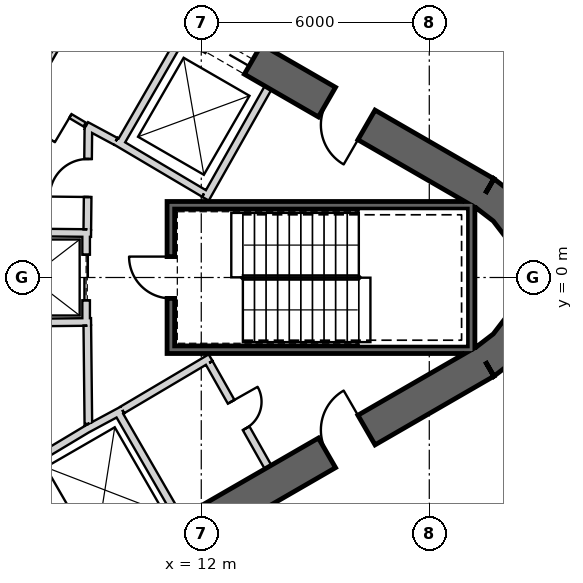
"""IFC4 building model, lengths in metres.
Left out: names, types, materials, properties, quantities, classifications, styles, units other than length and angle.
Written with IfcOpenShell. Run it as: python <this file> out.ifc"""

import sys

from ifc_helpers import new_model, si_unit, direction, frame, frame_2d, origin, place, context, subcontext, project, spatial, polyline, rectangle, outline, extrude, element, fill, save


model = new_model("IFC4")
c1 = context("Model", 3, precision=1e-05, world=origin(), true_north=direction((0.0, 1.0)))
c2 = subcontext(c1, "Body", "Model", "MODEL_VIEW")
j1 = project(units=[si_unit("LENGTHUNIT", "METRE"), si_unit("PLANEANGLEUNIT", "RADIAN")], contexts=[c1])
p1 = place(None, origin())
s1 = spatial("IfcSite", under=j1, at=p1, CompositionType="ELEMENT")
p2 = place(p1, origin())
s2 = spatial("IfcBuilding", under=s1, at=p2, CompositionType="ELEMENT")
p3 = place(p2, frame((0.0, 0.0, 217.2)))
s3 = spatial("IfcBuildingStorey", under=s2, at=p3, CompositionType="ELEMENT", Elevation=217.2)
p4 = place(p3, frame((19.475, 2.208, 0.0), z_axis=(0.0, 0.0, 1.0), x_axis=(-0.866028369851, 0.499994862586, 0.0)))
e1 = element("IfcWall", 1, at=p4, inside=s3, PredefinedType="SHEAR", context=c2, shape_type="SweptSolid", body=[
    extrude(rectangle(XDim=31.523, YDim=0.9, at=frame_2d((15.762, 0.0))), origin(), (0.0, 0.0, 1.0), 4.0),
])
p5 = place(p4, frame((7.062, 0.0, 0.0)))
e2 = element("IfcOpeningElement", 2, at=p5, cuts=e1, PredefinedType="OPENING", context=c2, shape_type="SweptSolid", body=[
    extrude(rectangle(XDim=1.2, YDim=2.4, at=frame_2d((0.6, 1.2))), frame((0.0, 0.46, 0.0), z_axis=(0.0, -1.0, 0.0), x_axis=(1.0, 0.0, 0.0)), (0.0, 0.0, 1.0), 0.92),
])
p6 = place(p4, frame((3.612, 0.0, 0.0)))
e3 = element("IfcOpeningElement", 3, at=p6, cuts=e1, PredefinedType="OPENING", context=c2, shape_type="SweptSolid", body=[
    extrude(rectangle(XDim=1.2, YDim=2.4, at=frame_2d((0.6, 1.2))), frame((0.0, 0.46, 0.0), z_axis=(0.0, -1.0, 0.0), x_axis=(1.0, 0.0, 0.0)), (0.0, 0.0, 1.0), 0.92),
])
p7 = place(p4, frame((26.712, 0.0, 0.0)))
e4 = element("IfcOpeningElement", 4, at=p7, cuts=e1, PredefinedType="OPENING", context=c2, shape_type="SweptSolid", body=[
    extrude(rectangle(XDim=1.2, YDim=2.4, at=frame_2d((0.6, 1.2))), frame((0.0, 0.46, 0.0), z_axis=(0.0, -1.0, 0.0), x_axis=(1.0, 0.0, 0.0)), (0.0, 0.0, 1.0), 0.92),
])
p8 = place(p3, frame((-7.825, -17.97, 0.0), z_axis=(0.0, 0.0, 1.0), x_axis=(0.866028369851, 0.499994862586, 0.0)))
e5 = element("IfcWall", 5, at=p8, inside=s3, PredefinedType="SHEAR", context=c2, shape_type="SweptSolid", body=[
    extrude(rectangle(XDim=31.523, YDim=0.9, at=frame_2d((15.762, 0.0))), origin(), (0.0, 0.0, 1.0), 4.0),
])
p9 = place(p8, frame((7.062, 0.0, 0.0)))
e6 = element("IfcOpeningElement", 6, at=p9, cuts=e5, PredefinedType="OPENING", context=c2, shape_type="SweptSolid", body=[
    extrude(rectangle(XDim=1.2, YDim=2.4, at=frame_2d((0.6, 1.2))), frame((0.0, 0.46, 0.0), z_axis=(0.0, -1.0, 0.0), x_axis=(1.0, 0.0, 0.0)), (0.0, 0.0, 1.0), 0.92),
])
p10 = place(p8, frame((9.762, 0.0, 0.0)))
e7 = element("IfcOpeningElement", 7, at=p10, cuts=e5, PredefinedType="OPENING", context=c2, shape_type="SweptSolid", body=[
    extrude(rectangle(XDim=1.2, YDim=2.4, at=frame_2d((0.6, 1.2))), frame((0.0, 0.46, 0.0), z_axis=(0.0, -1.0, 0.0), x_axis=(1.0, 0.0, 0.0)), (0.0, 0.0, 1.0), 0.92),
])
p11 = place(p8, frame((12.462, 0.0, 0.0)))
e8 = element("IfcOpeningElement", 8, at=p11, cuts=e5, PredefinedType="OPENING", context=c2, shape_type="SweptSolid", body=[
    extrude(rectangle(XDim=1.2, YDim=2.4, at=frame_2d((0.6, 1.2))), frame((0.0, 0.46, 0.0), z_axis=(0.0, -1.0, 0.0), x_axis=(1.0, 0.0, 0.0)), (0.0, 0.0, 1.0), 0.92),
])
p12 = place(p8, frame((15.162, 0.0, 0.0)))
e9 = element("IfcOpeningElement", 9, at=p12, cuts=e5, PredefinedType="OPENING", context=c2, shape_type="SweptSolid", body=[
    extrude(rectangle(XDim=1.2, YDim=2.4, at=frame_2d((0.6, 1.2))), frame((0.0, 0.46, 0.0), z_axis=(0.0, -1.0, 0.0), x_axis=(1.0, 0.0, 0.0)), (0.0, 0.0, 1.0), 0.92),
])
p13 = place(p8, frame((17.862, 0.0, 0.0)))
e10 = element("IfcOpeningElement", 10, at=p13, cuts=e5, PredefinedType="OPENING", context=c2, shape_type="SweptSolid", body=[
    extrude(rectangle(XDim=1.2, YDim=2.4, at=frame_2d((0.6, 1.2))), frame((0.0, 0.46, 0.0), z_axis=(0.0, -1.0, 0.0), x_axis=(1.0, 0.0, 0.0)), (0.0, 0.0, 1.0), 0.92),
])
p14 = place(p8, frame((20.562, 0.0, 0.0)))
e11 = element("IfcOpeningElement", 11, at=p14, cuts=e5, PredefinedType="OPENING", context=c2, shape_type="SweptSolid", body=[
    extrude(rectangle(XDim=1.2, YDim=2.4, at=frame_2d((0.6, 1.2))), frame((0.0, 0.46, 0.0), z_axis=(0.0, -1.0, 0.0), x_axis=(1.0, 0.0, 0.0)), (0.0, 0.0, 1.0), 0.92),
])
p15 = place(p8, frame((26.712, 0.0, 0.0)))
e12 = element("IfcOpeningElement", 12, at=p15, cuts=e5, PredefinedType="OPENING", context=c2, shape_type="SweptSolid", body=[
    extrude(rectangle(XDim=1.2, YDim=2.4, at=frame_2d((0.6, 1.2))), frame((0.0, 0.46, 0.0), z_axis=(0.0, -1.0, 0.0), x_axis=(1.0, 0.0, 0.0)), (0.0, 0.0, 1.0), 0.92),
])
p16 = place(p8, frame((3.612, 0.0, 0.0)))
e13 = element("IfcOpeningElement", 13, at=p16, cuts=e5, PredefinedType="OPENING", context=c2, shape_type="SweptSolid", body=[
    extrude(rectangle(XDim=1.2, YDim=2.4, at=frame_2d((0.6, 1.2))), frame((0.0, 0.46, 0.0), z_axis=(0.0, -1.0, 0.0), x_axis=(1.0, 0.0, 0.0)), (0.0, 0.0, 1.0), 0.92),
])
p17 = place(p3, origin())
e14 = element("IfcWall", 14, at=p17, inside=s3, PredefinedType="SHEAR", context=c2, shape_type="SweptSolid", body=[
    extrude(outline(polyline([(19.7, -2.598), (20.321, -2.121), (20.798, -1.5), (21.098, -0.777), (21.2, 0.0), (21.098, 0.777), (20.798, 1.5), (20.321, 2.121), (19.7, 2.598), (19.25, 1.819), (19.685, 1.485), (20.019, 1.05), (20.229, 0.543), (20.3, 0.0), (20.229, -0.543), (20.019, -1.05), (19.685, -1.485), (19.25, -1.819), (19.7, -2.598)])), origin(), (0.0, 0.0, 1.0), 4.0),
])
p18 = place(p3, frame((9.847, 3.495, 0.0), z_axis=(0.0, 0.0, 1.0), x_axis=(0.499984717929, 0.866034226713, 0.0)))
e15 = element("IfcWall", 15, at=p18, inside=s3, PredefinedType="PLUMBINGWALL", context=c2, shape_type="SweptSolid", body=[
    extrude(rectangle(XDim=3.25, YDim=0.2, at=frame_2d((1.625, 0.0))), origin(), (0.0, 0.0, 1.0), 3.7),
])
p19 = place(p3, frame((12.11, 2.073, 0.0), z_axis=(0.0, 0.0, 1.0), x_axis=(0.49196600604, 0.870614408852, 0.0)))
e16 = element("IfcWall", 16, at=p19, inside=s3, PredefinedType="PLUMBINGWALL", context=c2, shape_type="SweptSolid", body=[
    extrude(rectangle(XDim=3.35, YDim=0.2, at=frame_2d((1.675, 0.0))), origin(), (0.0, 0.0, 1.0), 3.7),
])
p20 = place(p3, frame((12.073, 2.211, 0.0), z_axis=(0.0, 0.0, 1.0), x_axis=(-0.860414880418, 0.509594185166, 0.0)))
e17 = element("IfcWall", 17, at=p20, inside=s3, PredefinedType="PLUMBINGWALL", context=c2, shape_type="SweptSolid", body=[
    extrude(rectangle(XDim=2.7, YDim=0.2, at=frame_2d((1.35, 0.0))), origin(), (0.0, 0.0, 1.0), 3.7),
])
p21 = place(p3, frame((9.795, -3.525, 0.0), z_axis=(0.0, 0.0, 1.0), x_axis=(0.499984717929, -0.866034226713, 0.0)))
e18 = element("IfcWall", 18, at=p21, inside=s3, PredefinedType="PLUMBINGWALL", context=c2, shape_type="SweptSolid", body=[
    extrude(rectangle(XDim=3.25, YDim=0.2, at=frame_2d((1.625, 0.0))), origin(), (0.0, 0.0, 1.0), 3.7),
])
p22 = place(p3, frame((8.974, -3.999, 0.0), z_axis=(0.0, 0.0, 1.0), x_axis=(0.880907015104, 0.473289373154, 0.0)))
e19 = element("IfcWall", 19, at=p22, inside=s3, PredefinedType="PLUMBINGWALL", context=c2, shape_type="SweptSolid", body=[
    extrude(rectangle(XDim=1.078, YDim=0.2, at=frame_2d((0.539, 0.0))), origin(), (0.0, 0.0, 1.0), 3.7),
])
p23 = place(p3, frame((7.497, -4.886, 0.0), z_axis=(0.0, 0.0, 1.0), x_axis=(0.857516281273, 0.51445682749, 0.0)))
e20 = element("IfcWall", 20, at=p23, inside=s3, PredefinedType="PLUMBINGWALL", context=c2, shape_type="SweptSolid", body=[
    extrude(rectangle(XDim=1.845, YDim=0.2, at=frame_2d((0.922, 0.0))), origin(), (0.0, 0.0, 1.0), 3.7),
])
p24 = place(p3, frame((19.2, 1.9, -0.3), z_axis=(0.0, 0.0, 1.0), x_axis=(-1.0, 0.0, 0.0)))
e21 = element("IfcWall", 21, at=p24, inside=s3, PredefinedType="SHEAR", context=c2, shape_type="SweptSolid", body=[
    extrude(rectangle(XDim=8.1, YDim=0.2, at=frame_2d((4.05, 0.0))), origin(), (0.0, 0.0, 1.0), 4.0),
])
p25 = place(p3, frame((19.1, -2.0, -0.3), z_axis=(0.0, 0.0, 1.0), x_axis=(0.0, 1.0, 0.0)))
e22 = element("IfcWall", 22, at=p25, inside=s3, PredefinedType="SHEAR", context=c2, shape_type="SweptSolid", body=[
    extrude(rectangle(XDim=3.8, YDim=0.2, at=frame_2d((1.9, 0.0))), origin(), (0.0, 0.0, 1.0), 4.0),
])
p26 = place(p3, frame((11.1, -1.9, -0.3), z_axis=(0.0, 0.0, 1.0), x_axis=(1.0, 0.0, 0.0)))
e23 = element("IfcWall", 23, at=p26, inside=s3, PredefinedType="SHEAR", context=c2, shape_type="SweptSolid", body=[
    extrude(rectangle(XDim=7.9, YDim=0.2, at=frame_2d((3.95, 0.0))), origin(), (0.0, 0.0, 1.0), 4.0),
])
p27 = place(p3, frame((11.2, -1.8, -0.3), z_axis=(0.0, 0.0, 1.0), x_axis=(0.0, 1.0, 0.0)))
e24 = element("IfcWall", 24, at=p27, inside=s3, PredefinedType="SHEAR", context=c2, shape_type="SweptSolid", body=[
    extrude(rectangle(XDim=3.6, YDim=0.2, at=frame_2d((1.8, 0.0))), origin(), (0.0, 0.0, 1.0), 4.0),
])
p28 = place(p27, frame((1.25, 0.0, 0.3)))
e25 = element("IfcOpeningElement", 25, at=p28, cuts=e24, PredefinedType="OPENING", context=c2, shape_type="SweptSolid", body=[
    extrude(rectangle(XDim=1.1, YDim=2.1, at=frame_2d((0.55, 1.05))), frame((0.0, 0.11, 0.0), z_axis=(0.0, -1.0, 0.0), x_axis=(1.0, 0.0, 0.0)), (0.0, 0.0, 1.0), 0.22),
])
p29 = place(p3, frame((8.97, 1.2, 0.0), z_axis=(0.0, 0.0, 1.0), x_axis=(0.0, -1.0, 0.0)))
e26 = element("IfcWall", 26, at=p29, inside=s3, PredefinedType="PLUMBINGWALL", context=c2, shape_type="SweptSolid", body=[
    extrude(rectangle(XDim=2.4, YDim=0.2, at=frame_2d((1.2, 0.0))), origin(), (0.0, 0.0, 1.0), 3.7),
])
p30 = place(p29, frame((0.6, 0.0, 0.0)))
e27 = element("IfcOpeningElement", 27, at=p30, cuts=e26, PredefinedType="OPENING", context=c2, shape_type="SweptSolid", body=[
    extrude(rectangle(XDim=1.2, YDim=2.4, at=frame_2d((0.6, 1.2))), frame((0.0, 0.11, 0.0), z_axis=(0.0, -1.0, 0.0), x_axis=(1.0, 0.0, 0.0)), (0.0, 0.0, 1.0), 0.22),
])
p31 = place(p3, frame((9.1, -1.169, 0.0), z_axis=(0.0, 0.0, 1.0), x_axis=(-0.999949988, -0.010001074852, 0.0)))
e28 = element("IfcWall", 28, at=p31, inside=s3, PredefinedType="PLUMBINGWALL", context=c2, shape_type="SweptSolid", body=[
    extrude(rectangle(XDim=3.1, YDim=0.2, at=frame_2d((1.55, 0.0))), origin(), (0.0, 0.0, 1.0), 3.7),
])
p32 = place(p3, frame((9.1, 1.169, 0.0), z_axis=(0.0, 0.0, 1.0), x_axis=(-0.99994990606, 0.010009264196, 0.0)))
e29 = element("IfcWall", 29, at=p32, inside=s3, PredefinedType="PLUMBINGWALL", context=c2, shape_type="SweptSolid", body=[
    extrude(rectangle(XDim=3.0, YDim=0.2, at=frame_2d((1.5, 0.0))), origin(), (0.0, 0.0, 1.0), 3.7),
])
p33 = place(p3, frame((7.508, 4.845, 0.0), z_axis=(0.0, 0.0, 1.0), x_axis=(0.500017246033, 0.866015446554, 0.0)))
e30 = element("IfcWall", 30, at=p33, inside=s3, PredefinedType="PARTITIONING", context=c2, shape_type="SweptSolid", body=[
    extrude(rectangle(XDim=3.25, YDim=0.12, at=frame_2d((1.625, 0.0))), origin(), (0.0, 0.0, 1.0), 3.7),
])
p34 = place(p3, frame((8.974, 3.999, 0.0), z_axis=(0.0, 0.0, 1.0), x_axis=(0.880917147855, -0.473270513147, 0.0)))
e31 = element("IfcWall", 31, at=p34, inside=s3, PredefinedType="PARTITIONING", context=c2, shape_type="SweptSolid", body=[
    extrude(rectangle(XDim=0.878, YDim=0.2, at=frame_2d((0.439, 0.0))), origin(), (0.0, 0.0, 1.0), 3.7),
])
p35 = place(p3, frame((7.493, 4.878, 0.0), z_axis=(0.0, 0.0, 1.0), x_axis=(0.8599829515, -0.510322763679, 0.0)))
e32 = element("IfcWall", 32, at=p35, inside=s3, PredefinedType="PARTITIONING", context=c2, shape_type="SweptSolid", body=[
    extrude(rectangle(XDim=1.672, YDim=0.12, at=frame_2d((0.836, 0.0))), origin(), (0.0, 0.0, 1.0), 3.7),
])
p36 = place(p35, frame((0.436, 0.0, 0.0)))
e33 = element("IfcOpeningElement", 33, at=p36, cuts=e32, PredefinedType="OPENING", context=c2, shape_type="SweptSolid", body=[
    extrude(rectangle(XDim=0.8, YDim=2.1, at=frame_2d((0.4, 1.05))), frame((0.0, 0.07, 0.0), z_axis=(0.0, -1.0, 0.0), x_axis=(1.0, 0.0, 0.0)), (0.0, 0.0, 1.0), 0.14),
])
p37 = place(p3, frame((12.245, -2.109, 0.0), z_axis=(0.0, 0.0, 1.0), x_axis=(-0.860414880418, -0.509594185166, 0.0)))
e34 = element("IfcWall", 34, at=p37, inside=s3, PredefinedType="PARTITIONING", context=c2, shape_type="SweptSolid", body=[
    extrude(rectangle(XDim=2.7, YDim=0.2, at=frame_2d((1.35, 0.0))), origin(), (0.0, 0.0, 1.0), 3.7),
])
p38 = place(p3, frame((13.758, -4.99, 0.0), z_axis=(0.0, 0.0, 1.0), x_axis=(-0.491993409184, 0.87059892334, 0.0)))
e35 = element("IfcWall", 35, at=p38, inside=s3, PredefinedType="PARTITIONING", context=c2, shape_type="SweptSolid", body=[
    extrude(rectangle(XDim=3.15, YDim=0.2, at=frame_2d((1.575, 0.0))), origin(), (0.0, 0.0, 1.0), 3.7),
])
p39 = place(p38, frame((1.175, 0.0, 0.0)))
e36 = element("IfcOpeningElement", 36, at=p39, cuts=e35, PredefinedType="OPENING", context=c2, shape_type="SweptSolid", body=[
    extrude(rectangle(XDim=0.8, YDim=2.1, at=frame_2d((0.4, 1.05))), frame((0.0, 0.11, 0.0), z_axis=(0.0, -1.0, 0.0), x_axis=(1.0, 0.0, 0.0)), (0.0, 0.0, 1.0), 0.22),
])
p40 = place(p3, frame((9.029, -3.851, 0.0), z_axis=(0.0, 0.0, 1.0), x_axis=(-0.010784614026, 0.999941844359, 0.0)))
e37 = element("IfcWall", 37, at=p40, inside=s3, PredefinedType="PARTITIONING", context=c2, shape_type="SweptSolid", body=[
    extrude(rectangle(XDim=2.581, YDim=0.2, at=frame_2d((1.291, 0.0))), origin(), (0.0, 0.0, 1.0), 3.7),
])
p41 = place(p3, frame((9.001, 1.27, 0.0), z_axis=(0.0, 0.0, 1.0), x_axis=(0.010728802716, 0.99994244474, 0.0)))
e38 = element("IfcWall", 38, at=p41, inside=s3, PredefinedType="PARTITIONING", context=c2, shape_type="SweptSolid", body=[
    extrude(rectangle(XDim=2.708, YDim=0.2, at=frame_2d((1.354, 0.0))), origin(), (0.0, 0.0, 1.0), 3.7),
])
p42 = place(p41, frame((0.848, 0.0, 0.0)))
e39 = element("IfcOpeningElement", 39, at=p42, cuts=e38, PredefinedType="OPENING", context=c2, shape_type="SweptSolid", body=[
    extrude(rectangle(XDim=1.0, YDim=2.1, at=frame_2d((0.5, 1.05))), frame((0.0, 0.11, 0.0), z_axis=(0.0, -1.0, 0.0), x_axis=(1.0, 0.0, 0.0)), (0.0, 0.0, 1.0), 0.22),
])
p43 = place(p28, origin())
e40 = element("IfcDoor", 40, at=p43, inside=s3, OperationType="SINGLE_SWING_LEFT", PredefinedType="USERDEFINED", context=c2, shape_type="SweptSolid", body=[
    extrude(rectangle(XDim=1.1, YDim=2.1, at=frame_2d((0.55, 1.05))), frame((0.0, 0.025, 0.0), z_axis=(0.0, -1.0, 0.0), x_axis=(1.0, 0.0, 0.0)), (0.0, 0.0, 1.0), 0.05),
])
fill(e25, e40)
p44 = place(p42, origin())
e41 = element("IfcDoor", 41, at=p44, inside=s3, OperationType="SINGLE_SWING_RIGHT", PredefinedType="USERDEFINED", context=c2, shape_type="SweptSolid", body=[
    extrude(rectangle(XDim=1.0, YDim=2.1, at=frame_2d((0.5, 1.05))), frame((0.0, 0.025, 0.0), z_axis=(0.0, -1.0, 0.0), x_axis=(1.0, 0.0, 0.0)), (0.0, 0.0, 1.0), 0.05),
])
fill(e39, e41)
p45 = place(p30, origin())
e42 = element("IfcDoor", 42, at=p45, inside=s3, OperationType="SLIDING_TO_LEFT", PredefinedType="USERDEFINED", context=c2, shape_type="SweptSolid", body=[
    extrude(rectangle(XDim=1.2, YDim=2.4, at=frame_2d((0.6, 1.2))), frame((0.0, 0.025, 0.0), z_axis=(0.0, -1.0, 0.0), x_axis=(1.0, 0.0, 0.0)), (0.0, 0.0, 1.0), 0.05),
])
fill(e27, e42)
p46 = place(p36, origin())
e43 = element("IfcDoor", 43, at=p46, inside=s3, OperationType="SINGLE_SWING_RIGHT", PredefinedType="USERDEFINED", context=c2, shape_type="SweptSolid", body=[
    extrude(rectangle(XDim=0.8, YDim=2.1, at=frame_2d((0.4, 1.05))), frame((0.0, 0.025, 0.0), z_axis=(0.0, -1.0, 0.0), x_axis=(1.0, 0.0, 0.0)), (0.0, 0.0, 1.0), 0.05),
])
fill(e33, e43)
p47 = place(p39, origin())
e44 = element("IfcDoor", 44, at=p47, inside=s3, OperationType="SINGLE_SWING_LEFT", PredefinedType="USERDEFINED", context=c2, shape_type="SweptSolid", body=[
    extrude(rectangle(XDim=0.8, YDim=2.1, at=frame_2d((0.4, 1.05))), frame((0.0, 0.025, 0.0), z_axis=(0.0, -1.0, 0.0), x_axis=(1.0, 0.0, 0.0)), (0.0, 0.0, 1.0), 0.05),
])
fill(e36, e44)
p48 = place(p5, origin())
e45 = element("IfcDoor", 45, at=p48, inside=s3, OperationType="SLIDING_TO_LEFT", PredefinedType="USERDEFINED", context=c2, shape_type="SweptSolid", body=[
    extrude(rectangle(XDim=1.2, YDim=2.4, at=frame_2d((0.6, 1.2))), frame((0.0, 0.025, 0.0), z_axis=(0.0, -1.0, 0.0), x_axis=(1.0, 0.0, 0.0)), (0.0, 0.0, 1.0), 0.05),
])
fill(e2, e45)
p49 = place(p15, origin())
e46 = element("IfcDoor", 46, at=p49, inside=s3, OperationType="SINGLE_SWING_LEFT", PredefinedType="USERDEFINED", context=c2, shape_type="SweptSolid", body=[
    extrude(rectangle(XDim=1.2, YDim=2.4, at=frame_2d((0.6, 1.2))), frame((0.0, 0.025, 0.0), z_axis=(0.0, -1.0, 0.0), x_axis=(1.0, 0.0, 0.0)), (0.0, 0.0, 1.0), 0.05),
])
fill(e12, e46)
p50 = place(p6, origin())
e47 = element("IfcDoor", 47, at=p50, inside=s3, OperationType="SINGLE_SWING_LEFT", PredefinedType="USERDEFINED", context=c2, shape_type="SweptSolid", body=[
    extrude(rectangle(XDim=1.2, YDim=2.4, at=frame_2d((0.6, 1.2))), frame((0.0, 0.025, 0.0), z_axis=(0.0, -1.0, 0.0), x_axis=(1.0, 0.0, 0.0)), (0.0, 0.0, 1.0), 0.05),
])
fill(e3, e47)
save(model, sys.argv[1])
